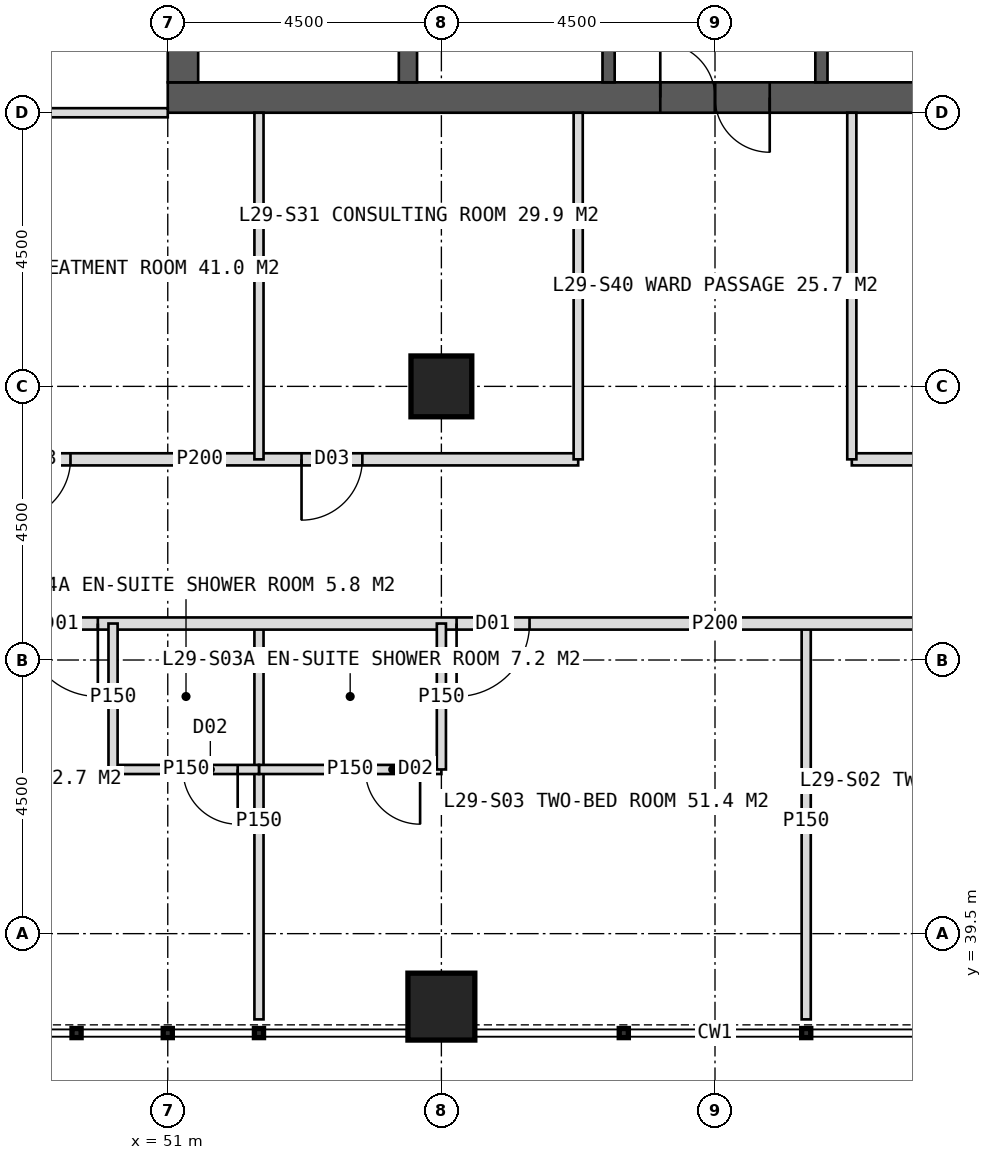
"""IFC4 building model, lengths in metres.
Left out: names, types, materials, properties, quantities, classifications, styles, units other than length and angle.
Written with IfcOpenShell. Run it as: python <this file> out.ifc"""

import sys

from ifc_helpers import new_model, si_unit, direction, frame, frame_2d, origin, origin_2d, place, context, subcontext, project, spatial, rectangle, hollow_rectangle, extrude, element, fill, save


model = new_model("IFC4")
c1 = context("Model", 3, precision=1e-05, world=origin(), true_north=direction((0.0, 1.0)))
c2 = subcontext(c1, "Body", "Model", "MODEL_VIEW")
j1 = project(units=[si_unit("LENGTHUNIT", "METRE"), si_unit("PLANEANGLEUNIT", "RADIAN")], contexts=[c1])
p1 = place(None, origin())
s1 = spatial("IfcSite", under=j1, at=p1, CompositionType="ELEMENT")
p2 = place(p1, origin())
s2 = spatial("IfcBuilding", under=s1, at=p2, CompositionType="ELEMENT")
p3 = place(p2, frame((0.0, 0.0, 124.0)))
s3 = spatial("IfcBuildingStorey", under=s2, at=p3, CompositionType="ELEMENT", Elevation=124.0)
p4 = place(p3, frame((51.0, 53.25, 0.0), z_axis=(0.0, 0.0, 1.0), x_axis=(1.0, 0.0, 0.0)))
e1 = element("IfcWall", 1, at=p4, inside=s3, PredefinedType="SHEAR", context=c2, shape_type="SweptSolid", body=[
    extrude(rectangle(XDim=18.0, YDim=0.5, at=frame_2d((9.0, 0.0))), origin(), (0.0, 0.0, 1.0), 4.0),
])
p5 = place(p4, frame((8.1, 0.0, 0.0)))
e2 = element("IfcOpeningElement", 2, at=p5, cuts=e1, PredefinedType="OPENING", context=c2, shape_type="SweptSolid", body=[
    extrude(rectangle(XDim=1.8, YDim=2.2, at=frame_2d((0.9, 1.1))), frame((0.0, 0.26, 0.0), z_axis=(0.0, -1.0, 0.0), x_axis=(1.0, 0.0, 0.0)), (0.0, 0.0, 1.0), 0.52),
])
p6 = place(p3, frame((51.25, 53.5, 0.0), z_axis=(0.0, 0.0, 1.0), x_axis=(0.0, 1.0, 0.0)))
e3 = element("IfcWall", 3, at=p6, inside=s3, PredefinedType="SHEAR", context=c2, shape_type="SweptSolid", body=[
    extrude(rectangle(XDim=17.0, YDim=0.5, at=frame_2d((8.5, 0.0))), origin(), (0.0, 0.0, 1.0), 4.0),
])
p7 = place(p6, frame((6.0, 0.0, 0.0)))
e4 = element("IfcOpeningElement", 4, at=p7, cuts=e3, PredefinedType="OPENING", context=c2, shape_type="SweptSolid", body=[
    extrude(rectangle(XDim=1.5, YDim=2.2, at=frame_2d((0.75, 1.1))), frame((0.0, 0.26, 0.0), z_axis=(0.0, -1.0, 0.0), x_axis=(1.0, 0.0, 0.0)), (0.0, 0.0, 1.0), 0.52),
])
p8 = place(p3, frame((54.95, 53.5, 0.0), z_axis=(0.0, 0.0, 1.0), x_axis=(0.0, 1.0, 0.0)))
e5 = element("IfcWall", 5, at=p8, inside=s3, PredefinedType="SHEAR", context=c2, shape_type="SweptSolid", body=[
    extrude(rectangle(XDim=17.0, YDim=0.3, at=frame_2d((8.5, 0.0))), origin(), (0.0, 0.0, 1.0), 4.0),
])
p9 = place(p3, frame((58.25, 53.5, 0.0), z_axis=(0.0, 0.0, 1.0), x_axis=(0.0, 1.0, 0.0)))
e6 = element("IfcWall", 6, at=p9, inside=s3, PredefinedType="SHEAR", context=c2, shape_type="SweptSolid", body=[
    extrude(rectangle(XDim=17.0, YDim=0.2, at=frame_2d((8.5, 0.0))), origin(), (0.0, 0.0, 1.0), 4.0),
])
p10 = place(p9, frame((1.375, 0.0, 0.0)))
e7 = element("IfcOpeningElement", 7, at=p10, cuts=e6, PredefinedType="OPENING", context=c2, shape_type="SweptSolid", body=[
    extrude(rectangle(XDim=1.4, YDim=2.2, at=frame_2d((0.7, 1.1))), frame((0.0, 0.11, 0.0), z_axis=(0.0, -1.0, 0.0), x_axis=(1.0, 0.0, 0.0)), (0.0, 0.0, 1.0), 0.22),
])
p11 = place(p9, frame((5.675, 0.0, 0.0)))
e8 = element("IfcOpeningElement", 8, at=p11, cuts=e6, PredefinedType="OPENING", context=c2, shape_type="SweptSolid", body=[
    extrude(rectangle(XDim=1.4, YDim=2.2, at=frame_2d((0.7, 1.1))), frame((0.0, 0.11, 0.0), z_axis=(0.0, -1.0, 0.0), x_axis=(1.0, 0.0, 0.0)), (0.0, 0.0, 1.0), 0.22),
])
p12 = place(p3, frame((61.75, 53.5, 0.0), z_axis=(0.0, 0.0, 1.0), x_axis=(0.0, 1.0, 0.0)))
e9 = element("IfcWall", 9, at=p12, inside=s3, PredefinedType="SHEAR", context=c2, shape_type="SweptSolid", body=[
    extrude(rectangle(XDim=17.0, YDim=0.2, at=frame_2d((8.5, 0.0))), origin(), (0.0, 0.0, 1.0), 4.0),
])
p13 = place(p12, frame((1.375, 0.0, 0.0)))
e10 = element("IfcOpeningElement", 10, at=p13, cuts=e9, PredefinedType="OPENING", context=c2, shape_type="SweptSolid", body=[
    extrude(rectangle(XDim=1.4, YDim=2.2, at=frame_2d((0.7, 1.1))), frame((0.0, 0.11, 0.0), z_axis=(0.0, -1.0, 0.0), x_axis=(1.0, 0.0, 0.0)), (0.0, 0.0, 1.0), 0.22),
])
p14 = place(p12, frame((5.675, 0.0, 0.0)))
e11 = element("IfcOpeningElement", 11, at=p14, cuts=e9, PredefinedType="OPENING", context=c2, shape_type="SweptSolid", body=[
    extrude(rectangle(XDim=1.4, YDim=2.2, at=frame_2d((0.7, 1.1))), frame((0.0, 0.11, 0.0), z_axis=(0.0, -1.0, 0.0), x_axis=(1.0, 0.0, 0.0)), (0.0, 0.0, 1.0), 0.22),
])
p15 = place(p3, frame((55.5, 48.5, 0.0), z_axis=(0.0, 0.0, 1.0), x_axis=(1.0, 0.0, 0.0)))
e12 = element("IfcColumn", 12, at=p15, inside=s3, PredefinedType="COLUMN", context=c2, shape_type="SweptSolid", body=[
    extrude(hollow_rectangle(XDim=1.0, YDim=1.0, WallThickness=0.1, at=origin_2d()), origin(), (0.0, 0.0, 1.0), 4.0),
])
p16 = place(p3, frame((55.5, 38.3, 0.0), z_axis=(0.0, 0.0, 1.0), x_axis=(1.0, 0.0, 0.0)))
e13 = element("IfcColumn", 13, at=p16, inside=s3, PredefinedType="COLUMN", context=c2, shape_type="SweptSolid", body=[
    extrude(hollow_rectangle(XDim=1.1, YDim=1.1, WallThickness=0.1, at=origin_2d()), origin(), (0.0, 0.0, 1.0), 4.0),
])
p17 = place(p3, frame((51.0, 53.0, 0.0), z_axis=(0.0, 0.0, 1.0), x_axis=(-1.0, 0.0, 0.0)))
e14 = element("IfcWall", 14, at=p17, inside=s3, PredefinedType="PARTITIONING", context=c2, shape_type="SweptSolid", body=[
    extrude(rectangle(XDim=5.7, YDim=0.15, at=frame_2d((2.85, 0.0))), origin(), (0.0, 0.0, 1.0), 3.75),
])
for number, where, z_axis, x_axis in (
    (15, (61.5, 44.6, 0.0), (0.0, 0.0, 1.0), (0.0, -1.0, 0.0)),
    (16, (52.5, 44.6, 0.0), (0.0, 0.0, 1.0), (0.0, -1.0, 0.0)),
):
    element("IfcWall", number, at=place(p3, frame(where, z_axis=z_axis, x_axis=x_axis)), inside=s3, PredefinedType="PARTITIONING", context=c2, shape_type="SweptSolid", body=[
        extrude(rectangle(XDim=6.51, YDim=0.15, at=frame_2d((3.255, 0.0))), origin(), (0.0, 0.0, 1.0), 3.75),
    ])
p18 = place(p3, frame((77.4, 44.6, 0.0), z_axis=(0.0, 0.0, 1.0), x_axis=(-1.0, 0.0, 0.0)))
e17 = element("IfcWall", 17, at=p18, inside=s3, PredefinedType="PARTITIONING", context=c2, shape_type="SweptSolid", body=[
    extrude(rectangle(XDim=34.8, YDim=0.2, at=frame_2d((17.4, 0.0))), origin(), (0.0, 0.0, 1.0), 3.75),
])
p19 = place(p18, frame((2.45, 0.0, 0.0)))
e18 = element("IfcOpeningElement", 18, at=p19, cuts=e17, PredefinedType="OPENING", context=c2, shape_type="SweptSolid", body=[
    extrude(rectangle(XDim=1.2, YDim=2.2, at=frame_2d((0.6, 1.1))), frame((0.0, 0.11, 0.0), z_axis=(0.0, -1.0, 0.0), x_axis=(1.0, 0.0, 0.0)), (0.0, 0.0, 1.0), 0.22),
])
p20 = place(p18, frame((10.15, 0.0, 0.0)))
e19 = element("IfcOpeningElement", 19, at=p20, cuts=e17, PredefinedType="OPENING", context=c2, shape_type="SweptSolid", body=[
    extrude(rectangle(XDim=1.2, YDim=2.2, at=frame_2d((0.6, 1.1))), frame((0.0, 0.11, 0.0), z_axis=(0.0, -1.0, 0.0), x_axis=(1.0, 0.0, 0.0)), (0.0, 0.0, 1.0), 0.22),
])
p21 = place(p18, frame((20.45, 0.0, 0.0)))
e20 = element("IfcOpeningElement", 20, at=p21, cuts=e17, PredefinedType="OPENING", context=c2, shape_type="SweptSolid", body=[
    extrude(rectangle(XDim=1.2, YDim=2.2, at=frame_2d((0.6, 1.1))), frame((0.0, 0.11, 0.0), z_axis=(0.0, -1.0, 0.0), x_axis=(1.0, 0.0, 0.0)), (0.0, 0.0, 1.0), 0.22),
])
p22 = place(p18, frame((27.55, 0.0, 0.0)))
e21 = element("IfcOpeningElement", 21, at=p22, cuts=e17, PredefinedType="OPENING", context=c2, shape_type="SweptSolid", body=[
    extrude(rectangle(XDim=1.2, YDim=2.2, at=frame_2d((0.6, 1.1))), frame((0.0, 0.11, 0.0), z_axis=(0.0, -1.0, 0.0), x_axis=(1.0, 0.0, 0.0)), (0.0, 0.0, 1.0), 0.22),
])
p23 = place(p3, frame((55.5, 42.2, 0.0), z_axis=(0.0, 0.0, 1.0), x_axis=(-1.0, 0.0, 0.0)))
e22 = element("IfcWall", 22, at=p23, inside=s3, PredefinedType="PARTITIONING", context=c2, shape_type="SweptSolid", body=[
    extrude(rectangle(XDim=3.0, YDim=0.15, at=frame_2d((1.5, 0.0))), origin(), (0.0, 0.0, 1.0), 3.75),
])
p24 = place(p23, frame((0.35, 0.0, 0.0)))
e23 = element("IfcOpeningElement", 23, at=p24, cuts=e22, PredefinedType="OPENING", context=c2, shape_type="SweptSolid", body=[
    extrude(rectangle(XDim=0.9, YDim=2.1, at=frame_2d((0.45, 1.05))), frame((0.0, 0.085, 0.0), z_axis=(0.0, -1.0, 0.0), x_axis=(1.0, 0.0, 0.0)), (0.0, 0.0, 1.0), 0.17),
])
p25 = place(p3, frame((55.5, 44.6, 0.0), z_axis=(0.0, 0.0, 1.0), x_axis=(0.0, -1.0, 0.0)))
e24 = element("IfcWall", 24, at=p25, inside=s3, PredefinedType="PARTITIONING", context=c2, shape_type="SweptSolid", body=[
    extrude(rectangle(XDim=2.4, YDim=0.15, at=frame_2d((1.2, 0.0))), origin(), (0.0, 0.0, 1.0), 2.95),
])
p26 = place(p3, frame((52.5, 42.2, 0.0), z_axis=(0.0, 0.0, 1.0), x_axis=(-1.0, 0.0, 0.0)))
e25 = element("IfcWall", 25, at=p26, inside=s3, PredefinedType="PARTITIONING", context=c2, shape_type="SweptSolid", body=[
    extrude(rectangle(XDim=2.4, YDim=0.15, at=frame_2d((1.2, 0.0))), origin(), (0.0, 0.0, 1.0), 3.75),
])
p27 = place(p26, frame((0.35, 0.0, 0.0)))
e26 = element("IfcOpeningElement", 26, at=p27, cuts=e25, PredefinedType="OPENING", context=c2, shape_type="SweptSolid", body=[
    extrude(rectangle(XDim=0.9, YDim=2.1, at=frame_2d((0.45, 1.05))), frame((0.0, 0.085, 0.0), z_axis=(0.0, -1.0, 0.0), x_axis=(1.0, 0.0, 0.0)), (0.0, 0.0, 1.0), 0.17),
])
p28 = place(p3, frame((50.1, 44.6, 0.0), z_axis=(0.0, 0.0, 1.0), x_axis=(0.0, -1.0, 0.0)))
e27 = element("IfcWall", 27, at=p28, inside=s3, PredefinedType="PARTITIONING", context=c2, shape_type="SweptSolid", body=[
    extrude(rectangle(XDim=2.4, YDim=0.15, at=frame_2d((1.2, 0.0))), origin(), (0.0, 0.0, 1.0), 3.75),
])
p29 = place(p3, frame((74.7, 47.3, 0.0), z_axis=(0.0, 0.0, 1.0), x_axis=(-1.0, 0.0, 0.0)))
e28 = element("IfcWall", 28, at=p29, inside=s3, PredefinedType="PARTITIONING", context=c2, shape_type="SweptSolid", body=[
    extrude(rectangle(XDim=12.45, YDim=0.2, at=frame_2d((6.225, 0.0))), origin(), (0.0, 0.0, 1.0), 3.75),
])
p30 = place(p29, frame((7.15, 0.0, 0.0)))
e29 = element("IfcOpeningElement", 29, at=p30, cuts=e28, PredefinedType="OPENING", context=c2, shape_type="SweptSolid", body=[
    extrude(rectangle(XDim=1.0, YDim=2.1, at=frame_2d((0.5, 1.05))), frame((0.0, 0.11, 0.0), z_axis=(0.0, -1.0, 0.0), x_axis=(1.0, 0.0, 0.0)), (0.0, 0.0, 1.0), 0.22),
])
p31 = place(p3, frame((57.75, 47.3, 0.0), z_axis=(0.0, 0.0, 1.0), x_axis=(-1.0, 0.0, 0.0)))
e30 = element("IfcWall", 30, at=p31, inside=s3, PredefinedType="PARTITIONING", context=c2, shape_type="SweptSolid", body=[
    extrude(rectangle(XDim=12.45, YDim=0.2, at=frame_2d((6.225, 0.0))), origin(), (0.0, 0.0, 1.0), 3.75),
])
p32 = place(p31, frame((3.55, 0.0, 0.0)))
e31 = element("IfcOpeningElement", 31, at=p32, cuts=e30, PredefinedType="OPENING", context=c2, shape_type="SweptSolid", body=[
    extrude(rectangle(XDim=1.0, YDim=2.1, at=frame_2d((0.5, 1.05))), frame((0.0, 0.11, 0.0), z_axis=(0.0, -1.0, 0.0), x_axis=(1.0, 0.0, 0.0)), (0.0, 0.0, 1.0), 0.22),
])
p33 = place(p31, frame((8.35, 0.0, 0.0)))
e32 = element("IfcOpeningElement", 32, at=p33, cuts=e30, PredefinedType="OPENING", context=c2, shape_type="SweptSolid", body=[
    extrude(rectangle(XDim=1.0, YDim=2.1, at=frame_2d((0.5, 1.05))), frame((0.0, 0.11, 0.0), z_axis=(0.0, -1.0, 0.0), x_axis=(1.0, 0.0, 0.0)), (0.0, 0.0, 1.0), 0.22),
])
for number, where, z_axis, x_axis in (
    (33, (62.25, 53.0, 0.0), (0.0, 0.0, 1.0), (0.0, -1.0, 0.0)),
    (34, (57.75, 53.0, 0.0), (0.0, 0.0, 1.0), (0.0, -1.0, 0.0)),
    (35, (52.5, 53.0, 0.0), (0.0, 0.0, 1.0), (0.0, -1.0, 0.0)),
):
    element("IfcWall", number, at=place(p3, frame(where, z_axis=z_axis, x_axis=x_axis)), inside=s3, PredefinedType="PARTITIONING", context=c2, shape_type="SweptSolid", body=[
        extrude(rectangle(XDim=5.7, YDim=0.15, at=frame_2d((2.85, 0.0))), origin(), (0.0, 0.0, 1.0), 3.75),
    ])
p34 = place(p21, origin())
e36 = element("IfcDoor", 36, at=p34, inside=s3, OperationType="SINGLE_SWING_RIGHT", PredefinedType="DOOR", context=c2, shape_type="SweptSolid", body=[
    extrude(rectangle(XDim=1.2, YDim=2.2, at=frame_2d((0.6, 1.1))), frame((0.0, 0.025, 0.0), z_axis=(0.0, -1.0, 0.0), x_axis=(1.0, 0.0, 0.0)), (0.0, 0.0, 1.0), 0.05),
])
fill(e20, e36)
p35 = place(p24, origin())
e37 = element("IfcDoor", 37, at=p35, inside=s3, OperationType="SINGLE_SWING_LEFT", PredefinedType="DOOR", context=c2, shape_type="SweptSolid", body=[
    extrude(rectangle(XDim=0.9, YDim=2.1, at=frame_2d((0.45, 1.05))), frame((0.0, 0.025, 0.0), z_axis=(0.0, -1.0, 0.0), x_axis=(1.0, 0.0, 0.0)), (0.0, 0.0, 1.0), 0.05),
])
fill(e23, e37)
p36 = place(p22, origin())
e38 = element("IfcDoor", 38, at=p36, inside=s3, OperationType="SINGLE_SWING_LEFT", PredefinedType="DOOR", context=c2, shape_type="SweptSolid", body=[
    extrude(rectangle(XDim=1.2, YDim=2.2, at=frame_2d((0.6, 1.1))), frame((0.0, 0.025, 0.0), z_axis=(0.0, -1.0, 0.0), x_axis=(1.0, 0.0, 0.0)), (0.0, 0.0, 1.0), 0.05),
])
fill(e21, e38)
p37 = place(p27, origin())
e39 = element("IfcDoor", 39, at=p37, inside=s3, OperationType="SINGLE_SWING_LEFT", PredefinedType="DOOR", context=c2, shape_type="SweptSolid", body=[
    extrude(rectangle(XDim=0.9, YDim=2.1, at=frame_2d((0.45, 1.05))), frame((0.0, 0.025, 0.0), z_axis=(0.0, -1.0, 0.0), x_axis=(1.0, 0.0, 0.0)), (0.0, 0.0, 1.0), 0.05),
])
fill(e26, e39)
p38 = place(p32, origin())
e40 = element("IfcDoor", 40, at=p38, inside=s3, OperationType="SINGLE_SWING_RIGHT", PredefinedType="DOOR", context=c2, shape_type="SweptSolid", body=[
    extrude(rectangle(XDim=1.0, YDim=2.1, at=frame_2d((0.5, 1.05))), frame((0.0, 0.025, 0.0), z_axis=(0.0, -1.0, 0.0), x_axis=(1.0, 0.0, 0.0)), (0.0, 0.0, 1.0), 0.05),
])
fill(e31, e40)
p39 = place(p33, origin())
e41 = element("IfcDoor", 41, at=p39, inside=s3, OperationType="SINGLE_SWING_RIGHT", PredefinedType="DOOR", context=c2, shape_type="SweptSolid", body=[
    extrude(rectangle(XDim=1.0, YDim=2.1, at=frame_2d((0.5, 1.05))), frame((0.0, 0.025, 0.0), z_axis=(0.0, -1.0, 0.0), x_axis=(1.0, 0.0, 0.0)), (0.0, 0.0, 1.0), 0.05),
])
fill(e32, e41)
p40 = place(p5, origin())
e42 = element("IfcDoor", 42, at=p40, inside=s3, OperationType="DOUBLE_DOOR_SINGLE_SWING", PredefinedType="DOOR", context=c2, shape_type="SweptSolid", body=[
    extrude(rectangle(XDim=1.8, YDim=2.2, at=frame_2d((0.9, 1.1))), frame((0.0, 0.025, 0.0), z_axis=(0.0, -1.0, 0.0), x_axis=(1.0, 0.0, 0.0)), (0.0, 0.0, 1.0), 0.05),
])
fill(e2, e42)
save(model, sys.argv[1])
